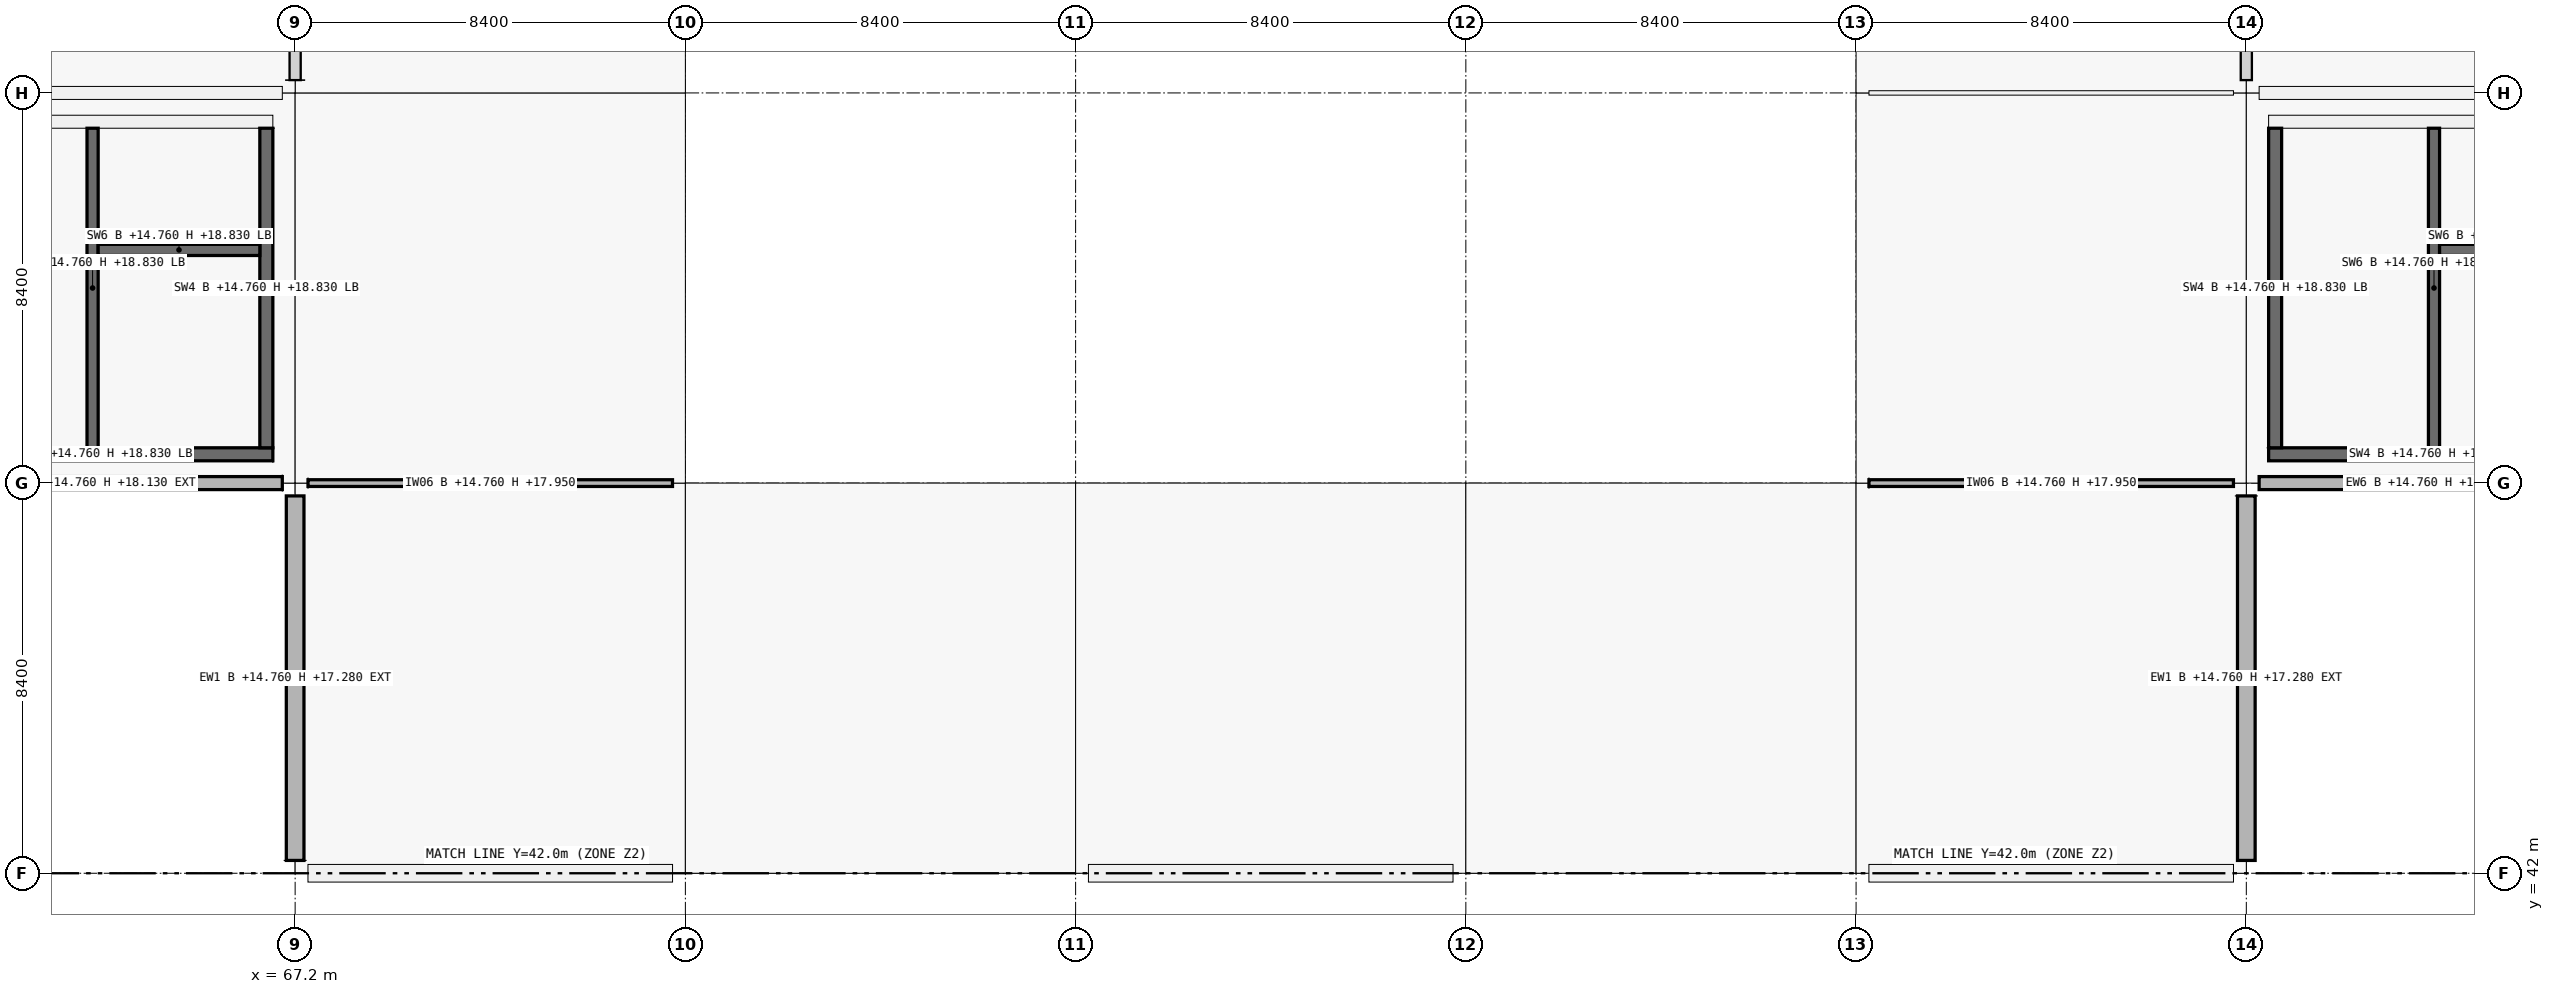
"""IFC4 building model, lengths in metres.
Left out: names, types, materials, properties, quantities, classifications, styles, units other than length and angle.
Written with IfcOpenShell. Run it as: python <this file> out.ifc"""

import sys

from ifc_helpers import new_model, si_unit, direction, frame, frame_2d, origin, origin_2d, place, context, subcontext, project, spatial, rectangle, i_section, extrude, element, fill, save


model = new_model("IFC4")
c1 = context("Model", 3, precision=1e-05, world=origin(), true_north=direction((0.0, 1.0)))
c2 = subcontext(c1, "Body", "Model", "MODEL_VIEW")
j1 = project(units=[si_unit("LENGTHUNIT", "METRE"), si_unit("PLANEANGLEUNIT", "RADIAN")], contexts=[c1])
p1 = place(None, origin())
s1 = spatial("IfcSite", under=j1, at=p1, CompositionType="ELEMENT")
p2 = place(p1, origin())
s2 = spatial("IfcBuilding", under=s1, at=p2, CompositionType="ELEMENT")
p3 = place(p2, frame((0.0, 0.0, 14.76)))
s3 = spatial("IfcBuildingStorey", under=s2, at=p3, CompositionType="ELEMENT", Elevation=14.76)
for number, where, z_axis, x_axis in (
    (1, (67.2, 42.0, 0.0), (0.0, 0.0, 1.0), (1.0, 0.0, 0.0)),
    (2, (67.2, 50.4, 0.0), (0.0, 0.0, 1.0), (1.0, 0.0, 0.0)),
    (3, (67.2, 58.8, 0.0), (0.0, 0.0, 1.0), (1.0, 0.0, 0.0)),
    (4, (75.6, 42.0, 0.0), (0.0, 0.0, 1.0), (1.0, 0.0, 0.0)),
    (5, (75.6, 50.4, 0.0), (0.0, 0.0, 1.0), (1.0, 0.0, 0.0)),
    (6, (75.6, 58.8, 0.0), (0.0, 0.0, 1.0), (1.0, 0.0, 0.0)),
    (7, (84.0, 42.0, 0.0), (0.0, 0.0, 1.0), (1.0, 0.0, 0.0)),
    (8, (84.0, 50.4, 0.0), (0.0, 0.0, 1.0), (1.0, 0.0, 0.0)),
    (9, (92.4, 42.0, 0.0), (0.0, 0.0, 1.0), (1.0, 0.0, 0.0)),
    (10, (92.4, 50.4, 0.0), (0.0, 0.0, 1.0), (1.0, 0.0, 0.0)),
    (11, (100.8, 42.0, 0.0), (0.0, 0.0, 1.0), (1.0, 0.0, 0.0)),
    (12, (100.8, 50.4, 0.0), (0.0, 0.0, 1.0), (1.0, 0.0, 0.0)),
    (13, (100.8, 58.8, 0.0), (0.0, 0.0, 1.0), (1.0, 0.0, 0.0)),
    (14, (109.2, 42.0, 0.0), (0.0, 0.0, 1.0), (1.0, 0.0, 0.0)),
    (15, (109.2, 50.4, 0.0), (0.0, 0.0, 1.0), (1.0, 0.0, 0.0)),
    (16, (109.2, 58.8, 0.0), (0.0, 0.0, 1.0), (1.0, 0.0, 0.0)),
):
    element("IfcColumn", number, at=place(p3, frame(where, z_axis=z_axis, x_axis=x_axis)), inside=s3, PredefinedType="COLUMN", context=c2, shape_type="SweptSolid", body=[
        extrude(rectangle(XDim=0.55, YDim=0.55, at=origin_2d()), origin(), (0.0, 0.0, 1.0), 4.14),
    ])
p4 = place(p3, frame((67.2, 50.4, 4.14), z_axis=(0.0, 0.0, 1.0), x_axis=(1.0, 0.0, 0.0)))
e17 = element("IfcColumn", 17, at=p4, inside=s3, PredefinedType="COLUMN", context=c2, shape_type="SweptSolid", body=[
    extrude(i_section(OverallWidth=0.305, OverallDepth=0.308, WebThickness=0.01, FlangeThickness=0.015, FilletRadius=0.017, at=origin_2d()), origin(), (0.0, 0.0, 1.0), 1.709),
])
p5 = place(p3, frame((67.2, 58.8, 4.14), z_axis=(0.0, 0.0, 1.0), x_axis=(1.0, 0.0, 0.0)))
e18 = element("IfcColumn", 18, at=p5, inside=s3, PredefinedType="COLUMN", context=c2, shape_type="SweptSolid", body=[
    extrude(i_section(OverallWidth=0.305, OverallDepth=0.308, WebThickness=0.01, FlangeThickness=0.015, FilletRadius=0.017, at=origin_2d()), origin(), (0.0, 0.0, 1.0), 2.558),
])
p6 = place(p3, frame((109.2, 50.4, 4.14), z_axis=(0.0, 0.0, 1.0), x_axis=(1.0, 0.0, 0.0)))
e19 = element("IfcColumn", 19, at=p6, inside=s3, PredefinedType="COLUMN", context=c2, shape_type="SweptSolid", body=[
    extrude(i_section(OverallWidth=0.305, OverallDepth=0.308, WebThickness=0.01, FlangeThickness=0.015, FilletRadius=0.017, at=origin_2d()), origin(), (0.0, 0.0, 1.0), 1.709),
])
p7 = place(p3, frame((109.2, 58.8, 4.14), z_axis=(0.0, 0.0, 1.0), x_axis=(1.0, 0.0, 0.0)))
e20 = element("IfcColumn", 20, at=p7, inside=s3, PredefinedType="COLUMN", context=c2, shape_type="SweptSolid", body=[
    extrude(i_section(OverallWidth=0.305, OverallDepth=0.308, WebThickness=0.01, FlangeThickness=0.015, FilletRadius=0.017, at=origin_2d()), origin(), (0.0, 0.0, 1.0), 2.558),
])
for number, where, z_axis, x_axis in (
    (21, (66.924, 50.4, 0.0), (0.0, 0.0, 1.0), (-1.0, 0.0, 0.0)),
    (22, (59.076, 58.8, 0.0), (0.0, 0.0, 1.0), (1.0, 0.0, 0.0)),
):
    element("IfcWall", number, at=place(p3, frame(where, z_axis=z_axis, x_axis=x_axis)), inside=s3, PredefinedType="SOLIDWALL", context=c2, shape_type="SweptSolid", body=[
        extrude(rectangle(XDim=7.848, YDim=0.28, at=frame_2d((3.924, 0.0))), origin(), (0.0, 0.0, 1.0), 3.37),
    ])
p8 = place(p3, frame((75.324, 42.0, 0.0), z_axis=(0.0, 0.0, 1.0), x_axis=(-1.0, 0.0, 0.0)))
e23 = element("IfcWall", 23, at=p8, inside=s3, PredefinedType="SOLIDWALL", context=c2, shape_type="SweptSolid", body=[
    extrude(rectangle(XDim=7.848, YDim=0.38, at=frame_2d((3.924, 0.0))), origin(), (0.0, 0.0, 1.0), 2.52),
])
for number, where, z_axis, x_axis in (
    (24, (67.2, 42.276, 0.0), (0.0, 0.0, 1.0), (0.0, 1.0, 0.0)),
    (25, (92.124, 42.0, 0.0), (0.0, 0.0, 1.0), (-1.0, 0.0, 0.0)),
    (26, (108.924, 42.0, 0.0), (0.0, 0.0, 1.0), (-1.0, 0.0, 0.0)),
    (27, (109.2, 50.124, 0.0), (0.0, 0.0, 1.0), (0.0, -1.0, 0.0)),
):
    element("IfcWall", number, at=place(p3, frame(where, z_axis=z_axis, x_axis=x_axis)), inside=s3, PredefinedType="SOLIDWALL", context=c2, shape_type="SweptSolid", body=[
        extrude(rectangle(XDim=7.848, YDim=0.38, at=frame_2d((3.924, 0.0))), origin(), (0.0, 0.0, 1.0), 2.52),
    ])
for number, where, z_axis, x_axis in (
    (28, (117.324, 50.4, 0.0), (0.0, 0.0, 1.0), (-1.0, 0.0, 0.0)),
    (29, (109.476, 58.8, 0.0), (0.0, 0.0, 1.0), (1.0, 0.0, 0.0)),
):
    element("IfcWall", number, at=place(p3, frame(where, z_axis=z_axis, x_axis=x_axis)), inside=s3, PredefinedType="SOLIDWALL", context=c2, shape_type="SweptSolid", body=[
        extrude(rectangle(XDim=7.848, YDim=0.28, at=frame_2d((3.924, 0.0))), origin(), (0.0, 0.0, 1.0), 3.37),
    ])
for number, where, z_axis, x_axis in (
    (30, (66.72, 51.02, 0.0), (0.0, 0.0, 1.0), (-1.0, 0.0, 0.0)),
    (31, (59.28, 58.18, 0.0), (0.0, 0.0, 1.0), (1.0, 0.0, 0.0)),
):
    element("IfcWall", number, at=place(p3, frame(where, z_axis=z_axis, x_axis=x_axis)), inside=s3, PredefinedType="SHEAR", context=c2, shape_type="SweptSolid", body=[
        extrude(rectangle(XDim=7.44, YDim=0.28, at=frame_2d((3.72, 0.0))), origin(), (0.0, 0.0, 1.0), 4.07),
    ])
p9 = place(p3, frame((66.58, 58.04, 0.0), z_axis=(0.0, 0.0, 1.0), x_axis=(0.0, -1.0, 0.0)))
e32 = element("IfcWall", 32, at=p9, inside=s3, PredefinedType="SHEAR", context=c2, shape_type="SweptSolid", body=[
    extrude(rectangle(XDim=6.88, YDim=0.28, at=frame_2d((3.44, 0.0))), origin(), (0.0, 0.0, 1.0), 4.07),
])
p10 = place(p9, frame((3.99, 0.0, 0.0)))
e33 = element("IfcOpeningElement", 33, at=p10, cuts=e32, PredefinedType="OPENING", context=c2, shape_type="SweptSolid", body=[
    extrude(rectangle(XDim=1.5, YDim=2.15, at=frame_2d((0.75, 1.075))), frame((0.0, 0.14, 0.0), z_axis=(0.0, -1.0, 0.0), x_axis=(1.0, 0.0, 0.0)), (0.0, 0.0, 1.0), 0.28),
])
p11 = place(p3, frame((62.84, 51.16, 0.0), z_axis=(0.0, 0.0, 1.0), x_axis=(0.0, 1.0, 0.0)))
e34 = element("IfcWall", 34, at=p11, inside=s3, PredefinedType="SHEAR", context=c2, shape_type="SweptSolid", body=[
    extrude(rectangle(XDim=6.88, YDim=0.24, at=frame_2d((3.44, 0.0))), origin(), (0.0, 0.0, 1.0), 4.07),
])
p12 = place(p11, frame((0.12, 0.0, 0.0)))
e35 = element("IfcOpeningElement", 35, at=p12, cuts=e34, PredefinedType="OPENING", context=c2, shape_type="SweptSolid", body=[
    extrude(rectangle(XDim=1.0, YDim=2.15, at=frame_2d((0.5, 1.075))), frame((0.0, 0.12, 0.0), z_axis=(0.0, -1.0, 0.0), x_axis=(1.0, 0.0, 0.0)), (0.0, 0.0, 1.0), 0.24),
])
p13 = place(p3, frame((62.96, 55.42, 0.0), z_axis=(0.0, 0.0, 1.0), x_axis=(1.0, 0.0, 0.0)))
e36 = element("IfcWall", 36, at=p13, inside=s3, PredefinedType="SHEAR", context=c2, shape_type="SweptSolid", body=[
    extrude(rectangle(XDim=3.48, YDim=0.24, at=frame_2d((1.74, 0.0))), origin(), (0.0, 0.0, 1.0), 4.07),
])
p14 = place(p13, frame((1.19, 0.0, 0.0)))
e37 = element("IfcOpeningElement", 37, at=p14, cuts=e36, PredefinedType="OPENING", context=c2, shape_type="SweptSolid", body=[
    extrude(rectangle(XDim=1.1, YDim=2.15, at=frame_2d((0.55, 1.075))), frame((0.0, 0.12, 0.0), z_axis=(0.0, -1.0, 0.0), x_axis=(1.0, 0.0, 0.0)), (0.0, 0.0, 1.0), 0.24),
])
p15 = place(p3, frame((117.12, 51.02, 0.0), z_axis=(0.0, 0.0, 1.0), x_axis=(-1.0, 0.0, 0.0)))
e38 = element("IfcWall", 38, at=p15, inside=s3, PredefinedType="SHEAR", context=c2, shape_type="SweptSolid", body=[
    extrude(rectangle(XDim=7.44, YDim=0.28, at=frame_2d((3.72, 0.0))), origin(), (0.0, 0.0, 1.0), 4.07),
])
p16 = place(p3, frame((109.82, 51.16, 0.0), z_axis=(0.0, 0.0, 1.0), x_axis=(0.0, 1.0, 0.0)))
e39 = element("IfcWall", 39, at=p16, inside=s3, PredefinedType="SHEAR", context=c2, shape_type="SweptSolid", body=[
    extrude(rectangle(XDim=6.88, YDim=0.28, at=frame_2d((3.44, 0.0))), origin(), (0.0, 0.0, 1.0), 4.07),
])
p17 = place(p3, frame((109.68, 58.18, 0.0), z_axis=(0.0, 0.0, 1.0), x_axis=(1.0, 0.0, 0.0)))
e40 = element("IfcWall", 40, at=p17, inside=s3, PredefinedType="SHEAR", context=c2, shape_type="SweptSolid", body=[
    extrude(rectangle(XDim=7.44, YDim=0.28, at=frame_2d((3.72, 0.0))), origin(), (0.0, 0.0, 1.0), 4.07),
])
p18 = place(p3, frame((113.24, 51.16, 0.0), z_axis=(0.0, 0.0, 1.0), x_axis=(0.0, 1.0, 0.0)))
e41 = element("IfcWall", 41, at=p18, inside=s3, PredefinedType="SHEAR", context=c2, shape_type="SweptSolid", body=[
    extrude(rectangle(XDim=6.88, YDim=0.24, at=frame_2d((3.44, 0.0))), origin(), (0.0, 0.0, 1.0), 4.07),
])
p19 = place(p18, frame((0.12, 0.0, 0.0)))
e42 = element("IfcOpeningElement", 42, at=p19, cuts=e41, PredefinedType="OPENING", context=c2, shape_type="SweptSolid", body=[
    extrude(rectangle(XDim=1.0, YDim=2.15, at=frame_2d((0.5, 1.075))), frame((0.0, 0.12, 0.0), z_axis=(0.0, -1.0, 0.0), x_axis=(1.0, 0.0, 0.0)), (0.0, 0.0, 1.0), 0.24),
])
p20 = place(p3, frame((113.36, 55.42, 0.0), z_axis=(0.0, 0.0, 1.0), x_axis=(1.0, 0.0, 0.0)))
e43 = element("IfcWall", 43, at=p20, inside=s3, PredefinedType="SHEAR", context=c2, shape_type="SweptSolid", body=[
    extrude(rectangle(XDim=3.48, YDim=0.24, at=frame_2d((1.74, 0.0))), origin(), (0.0, 0.0, 1.0), 4.07),
])
p21 = place(p20, frame((1.19, 0.0, 0.0)))
e44 = element("IfcOpeningElement", 44, at=p21, cuts=e43, PredefinedType="OPENING", context=c2, shape_type="SweptSolid", body=[
    extrude(rectangle(XDim=1.1, YDim=2.15, at=frame_2d((0.55, 1.075))), frame((0.0, 0.12, 0.0), z_axis=(0.0, -1.0, 0.0), x_axis=(1.0, 0.0, 0.0)), (0.0, 0.0, 1.0), 0.24),
])
p22 = place(p3, frame((67.477, 50.4, 0.0), z_axis=(0.0, 0.0, 1.0), x_axis=(1.0, 0.0, 0.0)))
e45 = element("IfcWall", 45, at=p22, inside=s3, PredefinedType="PARTITIONING", context=c2, shape_type="SweptSolid", body=[
    extrude(rectangle(XDim=7.846, YDim=0.145, at=frame_2d((3.923, 0.0))), origin(), (0.0, 0.0, 1.0), 3.19),
])
p23 = place(p22, frame((3.248, 0.0, 0.0)))
e46 = element("IfcOpeningElement", 46, at=p23, cuts=e45, PredefinedType="OPENING", context=c2, shape_type="SweptSolid", body=[
    extrude(rectangle(XDim=1.35, YDim=2.2, at=frame_2d((0.675, 1.1))), frame((0.0, 0.073, 0.0), z_axis=(0.0, -1.0, 0.0), x_axis=(1.0, 0.0, 0.0)), (0.0, 0.0, 1.0), 0.145),
])
p24 = place(p3, frame((101.077, 50.4, 0.0), z_axis=(0.0, 0.0, 1.0), x_axis=(1.0, 0.0, 0.0)))
e47 = element("IfcWall", 47, at=p24, inside=s3, PredefinedType="PARTITIONING", context=c2, shape_type="SweptSolid", body=[
    extrude(rectangle(XDim=7.846, YDim=0.145, at=frame_2d((3.923, 0.0))), origin(), (0.0, 0.0, 1.0), 3.19),
])
p25 = place(p24, frame((3.123, 0.0, 0.0)))
e48 = element("IfcOpeningElement", 48, at=p25, cuts=e47, PredefinedType="OPENING", context=c2, shape_type="SweptSolid", body=[
    extrude(rectangle(XDim=1.6, YDim=2.3, at=frame_2d((0.8, 1.15))), frame((0.0, 0.073, 0.0), z_axis=(0.0, -1.0, 0.0), x_axis=(1.0, 0.0, 0.0)), (0.0, 0.0, 1.0), 0.145),
])
p26 = place(p3, frame((101.077, 58.8, 0.0), z_axis=(0.0, 0.0, 1.0), x_axis=(1.0, 0.0, 0.0)))
e49 = element("IfcWall", 49, at=p26, inside=s3, PredefinedType="PARTITIONING", context=c2, shape_type="SweptSolid", body=[
    extrude(rectangle(XDim=7.846, YDim=0.095, at=frame_2d((3.923, 0.0))), origin(), (0.0, 0.0, 1.0), 3.19),
])
p27 = place(p26, frame((3.173, 0.0, 0.0)))
e50 = element("IfcOpeningElement", 50, at=p27, cuts=e49, PredefinedType="OPENING", context=c2, shape_type="SweptSolid", body=[
    extrude(rectangle(XDim=1.5, YDim=2.25, at=frame_2d((0.75, 1.125))), frame((0.0, 0.047, 0.0), z_axis=(0.0, -1.0, 0.0), x_axis=(1.0, 0.0, 0.0)), (0.0, 0.0, 1.0), 0.095),
])
p28 = place(p12, origin())
e51 = element("IfcDoor", 51, at=p28, inside=s3, OperationType="SINGLE_SWING_RIGHT", PredefinedType="DOOR", context=c2, shape_type="SweptSolid", body=[
    extrude(rectangle(XDim=1.0, YDim=2.15, at=frame_2d((0.5, 1.075))), frame((0.0, 0.025, 0.0), z_axis=(0.0, -1.0, 0.0), x_axis=(1.0, 0.0, 0.0)), (0.0, 0.0, 1.0), 0.05),
])
fill(e35, e51)
p29 = place(p10, origin())
e52 = element("IfcDoor", 52, at=p29, inside=s3, OperationType="DOUBLE_DOOR_SINGLE_SWING", PredefinedType="DOOR", context=c2, shape_type="SweptSolid", body=[
    extrude(rectangle(XDim=1.5, YDim=2.15, at=frame_2d((0.75, 1.075))), frame((0.0, 0.025, 0.0), z_axis=(0.0, -1.0, 0.0), x_axis=(1.0, 0.0, 0.0)), (0.0, 0.0, 1.0), 0.05),
])
fill(e33, e52)
p30 = place(p14, origin())
e53 = element("IfcDoor", 53, at=p30, inside=s3, OperationType="DOUBLE_DOOR_SLIDING", PredefinedType="DOOR", context=c2, shape_type="SweptSolid", body=[
    extrude(rectangle(XDim=1.1, YDim=2.15, at=frame_2d((0.55, 1.075))), frame((0.0, 0.025, 0.0), z_axis=(0.0, -1.0, 0.0), x_axis=(1.0, 0.0, 0.0)), (0.0, 0.0, 1.0), 0.05),
])
fill(e37, e53)
p31 = place(p19, origin())
e54 = element("IfcDoor", 54, at=p31, inside=s3, OperationType="SINGLE_SWING_LEFT", PredefinedType="DOOR", context=c2, shape_type="SweptSolid", body=[
    extrude(rectangle(XDim=1.0, YDim=2.15, at=frame_2d((0.5, 1.075))), frame((0.0, 0.025, 0.0), z_axis=(0.0, -1.0, 0.0), x_axis=(1.0, 0.0, 0.0)), (0.0, 0.0, 1.0), 0.05),
])
fill(e42, e54)
p32 = place(p23, origin())
e55 = element("IfcDoor", 55, at=p32, inside=s3, OperationType="DOUBLE_DOOR_SINGLE_SWING", PredefinedType="DOOR", context=c2, shape_type="SweptSolid", body=[
    extrude(rectangle(XDim=1.35, YDim=2.2, at=frame_2d((0.675, 1.1))), frame((0.0, 0.025, 0.0), z_axis=(0.0, -1.0, 0.0), x_axis=(1.0, 0.0, 0.0)), (0.0, 0.0, 1.0), 0.05),
])
fill(e46, e55)
p33 = place(p25, origin())
e56 = element("IfcDoor", 56, at=p33, inside=s3, OperationType="DOUBLE_DOOR_SINGLE_SWING", PredefinedType="DOOR", context=c2, shape_type="SweptSolid", body=[
    extrude(rectangle(XDim=1.6, YDim=2.3, at=frame_2d((0.8, 1.15))), frame((0.0, 0.025, 0.0), z_axis=(0.0, -1.0, 0.0), x_axis=(1.0, 0.0, 0.0)), (0.0, 0.0, 1.0), 0.05),
])
fill(e48, e56)
p34 = place(p27, origin())
e57 = element("IfcDoor", 57, at=p34, inside=s3, OperationType="DOUBLE_DOOR_SINGLE_SWING", PredefinedType="DOOR", context=c2, shape_type="SweptSolid", body=[
    extrude(rectangle(XDim=1.5, YDim=2.25, at=frame_2d((0.75, 1.125))), frame((0.0, 0.025, 0.0), z_axis=(0.0, -1.0, 0.0), x_axis=(1.0, 0.0, 0.0)), (0.0, 0.0, 1.0), 0.05),
])
fill(e50, e57)
save(model, sys.argv[1])
